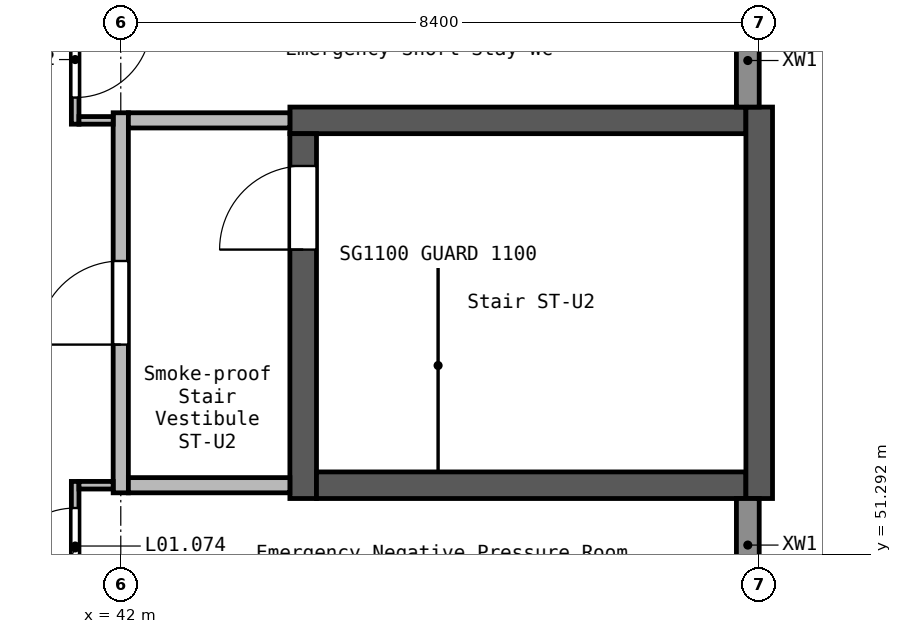
"""IFC4 building model, lengths in metres.
Left out: names, types, materials, properties, quantities, classifications, styles, units other than length and angle.
Written with IfcOpenShell. Run it as: python <this file> out.ifc"""

import sys

from ifc_helpers import new_model, si_unit, direction, frame, frame_2d, origin, place, context, subcontext, project, spatial, rectangle, extrude, element, fill, save


model = new_model("IFC4")
c1 = context("Model", 3, precision=1e-05, world=origin(), true_north=direction((0.0, 1.0)))
c2 = subcontext(c1, "Body", "Model", "MODEL_VIEW")
j1 = project(units=[si_unit("LENGTHUNIT", "METRE"), si_unit("PLANEANGLEUNIT", "RADIAN")], contexts=[c1])
p1 = place(None, origin())
s1 = spatial("IfcSite", under=j1, at=p1, CompositionType="ELEMENT")
p2 = place(p1, origin())
s2 = spatial("IfcBuilding", under=s1, at=p2, CompositionType="ELEMENT")
p3 = place(p2, frame((0.0, 0.0, 5.4)))
s3 = spatial("IfcBuildingStorey", under=s2, at=p3, CompositionType="ELEMENT", Elevation=5.4)
p4 = place(p3, frame((44.225, 57.0, 0.0), z_axis=(0.0, 0.0, 1.0), x_axis=(1.0, 0.0, 0.0)))
e1 = element("IfcWall", 1, at=p4, inside=s3, PredefinedType="SHEAR", context=c2, shape_type="SweptSolid", body=[
    extrude(rectangle(XDim=6.0, YDim=0.35, at=frame_2d((3.0, 0.0))), origin(), (0.0, 0.0, 1.0), 4.5),
])
p5 = place(p3, frame((44.4, 52.025, 0.0), z_axis=(0.0, 0.0, 1.0), x_axis=(0.0, 1.0, 0.0)))
e2 = element("IfcWall", 2, at=p5, inside=s3, PredefinedType="SHEAR", context=c2, shape_type="SweptSolid", body=[
    extrude(rectangle(XDim=4.8, YDim=0.35, at=frame_2d((2.4, 0.0))), origin(), (0.0, 0.0, 1.0), 4.5),
])
p6 = place(p5, frame((3.275, 0.0, 0.0)))
e3 = element("IfcOpeningElement", 3, at=p6, cuts=e2, PredefinedType="OPENING", context=c2, shape_type="SweptSolid", body=[
    extrude(rectangle(XDim=1.1, YDim=2.1, at=frame_2d((0.55, 1.05))), frame((0.0, 0.185, 0.0), z_axis=(0.0, -1.0, 0.0), x_axis=(1.0, 0.0, 0.0)), (0.0, 0.0, 1.0), 0.37),
])
p7 = place(p3, frame((44.575, 52.2, 0.0), z_axis=(0.0, 0.0, 1.0), x_axis=(1.0, 0.0, 0.0)))
e4 = element("IfcWall", 4, at=p7, inside=s3, PredefinedType="SHEAR", context=c2, shape_type="SweptSolid", body=[
    extrude(rectangle(XDim=5.65, YDim=0.35, at=frame_2d((2.825, 0.0))), origin(), (0.0, 0.0, 1.0), 4.5),
])
p8 = place(p3, frame((50.4, 52.025, 0.0), z_axis=(0.0, 0.0, 1.0), x_axis=(0.0, 1.0, 0.0)))
e5 = element("IfcWall", 5, at=p8, inside=s3, PredefinedType="SHEAR", context=c2, shape_type="SweptSolid", body=[
    extrude(rectangle(XDim=5.15, YDim=0.35, at=frame_2d((2.575, 0.0))), origin(), (0.0, 0.0, 1.0), 4.5),
])
for number, where, z_axis, x_axis in (
    (6, (50.25, 50.8, 0.0), (0.0, 0.0, 1.0), (0.0, 1.0, 0.0)),
    (7, (50.25, 57.175, 0.0), (0.0, 0.0, 1.0), (0.0, 1.0, 0.0)),
):
    element("IfcWall", number, at=place(p3, frame(where, z_axis=z_axis, x_axis=x_axis)), inside=s3, PredefinedType="STANDARD", context=c2, shape_type="SweptSolid", body=[
        extrude(rectangle(XDim=1.225, YDim=0.3, at=frame_2d((0.612, 0.0))), origin(), (0.0, 0.0, 1.0), 3.35),
    ])
p9 = place(p3, frame((42.0, 52.1, 0.0), z_axis=(0.0, 0.0, 1.0), x_axis=(0.0, 1.0, 0.0)))
e8 = element("IfcWall", 8, at=p9, inside=s3, PredefinedType="SOLIDWALL", context=c2, shape_type="SweptSolid", body=[
    extrude(rectangle(XDim=5.0, YDim=0.2, at=frame_2d((2.5, 0.0))), origin(), (0.0, 0.0, 1.0), 4.15),
])
p10 = place(p9, frame((1.95, 0.0, 0.0)))
e9 = element("IfcOpeningElement", 9, at=p10, cuts=e8, PredefinedType="OPENING", context=c2, shape_type="SweptSolid", body=[
    extrude(rectangle(XDim=1.1, YDim=2.1, at=frame_2d((0.55, 1.05))), frame((0.0, 0.11, 0.0), z_axis=(0.0, -1.0, 0.0), x_axis=(1.0, 0.0, 0.0)), (0.0, 0.0, 1.0), 0.22),
])
for number, where, z_axis, x_axis in (
    (10, (42.1, 52.2, 0.0), (0.0, 0.0, 1.0), (1.0, 0.0, 0.0)),
    (11, (42.1, 57.0, 0.0), (0.0, 0.0, 1.0), (1.0, 0.0, 0.0)),
):
    element("IfcWall", number, at=place(p3, frame(where, z_axis=z_axis, x_axis=x_axis)), inside=s3, PredefinedType="SOLIDWALL", context=c2, shape_type="SweptSolid", body=[
        extrude(rectangle(XDim=2.125, YDim=0.2, at=frame_2d((1.062, 0.0))), origin(), (0.0, 0.0, 1.0), 4.15),
    ])
p11 = place(p3, frame((41.4, 75.3, 0.0), z_axis=(0.0, 0.0, 1.0), x_axis=(0.0, -1.0, 0.0)))
e12 = element("IfcWall", 12, at=p11, inside=s3, PredefinedType="PARTITIONING", context=c2, shape_type="SweptSolid", body=[
    extrude(rectangle(XDim=18.35, YDim=0.1, at=frame_2d((9.175, 0.0))), origin(), (0.0, 0.0, 1.0), 4.15),
])
p12 = place(p11, frame((17.0, 0.0, 0.0)))
e13 = element("IfcOpeningElement", 13, at=p12, cuts=e12, PredefinedType="OPENING", context=c2, shape_type="SweptSolid", body=[
    extrude(rectangle(XDim=1.0, YDim=2.1, at=frame_2d((0.5, 1.05))), frame((0.0, 0.06, 0.0), z_axis=(0.0, -1.0, 0.0), x_axis=(1.0, 0.0, 0.0)), (0.0, 0.0, 1.0), 0.12),
])
p13 = place(p11, frame((13.05, 0.0, 0.0)))
e14 = element("IfcOpeningElement", 14, at=p13, cuts=e12, PredefinedType="OPENING", context=c2, shape_type="SweptSolid", body=[
    extrude(rectangle(XDim=0.9, YDim=2.1, at=frame_2d((0.45, 1.05))), frame((0.0, 0.06, 0.0), z_axis=(0.0, -1.0, 0.0), x_axis=(1.0, 0.0, 0.0)), (0.0, 0.0, 1.0), 0.12),
])
p14 = place(p11, frame((8.6, 0.0, 0.0)))
e15 = element("IfcOpeningElement", 15, at=p14, cuts=e12, PredefinedType="OPENING", context=c2, shape_type="SweptSolid", body=[
    extrude(rectangle(XDim=1.4, YDim=2.1, at=frame_2d((0.7, 1.05))), frame((0.0, 0.06, 0.0), z_axis=(0.0, -1.0, 0.0), x_axis=(1.0, 0.0, 0.0)), (0.0, 0.0, 1.0), 0.12),
])
p15 = place(p11, frame((5.0, 0.0, 0.0)))
e16 = element("IfcOpeningElement", 16, at=p15, cuts=e12, PredefinedType="OPENING", context=c2, shape_type="SweptSolid", body=[
    extrude(rectangle(XDim=1.4, YDim=2.1, at=frame_2d((0.7, 1.05))), frame((0.0, 0.06, 0.0), z_axis=(0.0, -1.0, 0.0), x_axis=(1.0, 0.0, 0.0)), (0.0, 0.0, 1.0), 0.12),
])
p16 = place(p11, frame((0.8, 0.0, 0.0)))
e17 = element("IfcOpeningElement", 17, at=p16, cuts=e12, PredefinedType="OPENING", context=c2, shape_type="SweptSolid", body=[
    extrude(rectangle(XDim=1.4, YDim=2.1, at=frame_2d((0.7, 1.05))), frame((0.0, 0.06, 0.0), z_axis=(0.0, -1.0, 0.0), x_axis=(1.0, 0.0, 0.0)), (0.0, 0.0, 1.0), 0.12),
])
p17 = place(p3, frame((41.4, 50.5, 0.0), z_axis=(0.0, 0.0, 1.0), x_axis=(0.0, 1.0, 0.0)))
e18 = element("IfcWall", 18, at=p17, inside=s3, PredefinedType="PARTITIONING", context=c2, shape_type="SweptSolid", body=[
    extrude(rectangle(XDim=1.75, YDim=0.1, at=frame_2d((0.875, 0.0))), origin(), (0.0, 0.0, 1.0), 4.15),
])
p18 = place(p17, frame((0.4, 0.0, 0.0)))
e19 = element("IfcOpeningElement", 19, at=p18, cuts=e18, PredefinedType="OPENING", context=c2, shape_type="SweptSolid", body=[
    extrude(rectangle(XDim=1.0, YDim=2.1, at=frame_2d((0.5, 1.05))), frame((0.0, 0.06, 0.0), z_axis=(0.0, -1.0, 0.0), x_axis=(1.0, 0.0, 0.0)), (0.0, 0.0, 1.0), 0.12),
])
for number, where, z_axis, x_axis in (
    (20, (41.45, 52.2, 0.0), (0.0, 0.0, 1.0), (1.0, 0.0, 0.0)),
    (21, (41.45, 57.0, 0.0), (0.0, 0.0, 1.0), (1.0, 0.0, 0.0)),
):
    element("IfcWall", number, at=place(p3, frame(where, z_axis=z_axis, x_axis=x_axis)), inside=s3, PredefinedType="PARTITIONING", context=c2, shape_type="SweptSolid", body=[
        extrude(rectangle(XDim=0.45, YDim=0.1, at=frame_2d((0.225, 0.0))), origin(), (0.0, 0.0, 1.0), 4.15),
    ])
p19 = place(p6, frame((1.1, 0.0, 0.0), z_axis=(0.0, 0.0, 1.0), x_axis=(-1.0, 0.0, 0.0)))
e22 = element("IfcDoor", 22, at=p19, inside=s3, OperationType="SINGLE_SWING_LEFT", PredefinedType="DOOR", context=c2, shape_type="SweptSolid", body=[
    extrude(rectangle(XDim=1.1, YDim=2.1, at=frame_2d((0.55, 1.05))), frame((0.0, 0.025, 0.0), z_axis=(0.0, -1.0, 0.0), x_axis=(1.0, 0.0, 0.0)), (0.0, 0.0, 1.0), 0.05),
])
fill(e3, e22)
p20 = place(p10, frame((1.1, 0.0, 0.0), z_axis=(0.0, 0.0, 1.0), x_axis=(-1.0, 0.0, 0.0)))
e23 = element("IfcDoor", 23, at=p20, inside=s3, OperationType="SINGLE_SWING_RIGHT", PredefinedType="DOOR", context=c2, shape_type="SweptSolid", body=[
    extrude(rectangle(XDim=1.1, YDim=2.1, at=frame_2d((0.55, 1.05))), frame((0.0, 0.025, 0.0), z_axis=(0.0, -1.0, 0.0), x_axis=(1.0, 0.0, 0.0)), (0.0, 0.0, 1.0), 0.05),
])
fill(e9, e23)
p21 = place(p18, frame((1.0, 0.0, 0.0), z_axis=(0.0, 0.0, 1.0), x_axis=(-1.0, 0.0, 0.0)))
e24 = element("IfcDoor", 24, at=p21, inside=s3, OperationType="SINGLE_SWING_LEFT", PredefinedType="DOOR", context=c2, shape_type="SweptSolid", body=[
    extrude(rectangle(XDim=1.0, YDim=2.1, at=frame_2d((0.5, 1.05))), frame((0.0, 0.025, 0.0), z_axis=(0.0, -1.0, 0.0), x_axis=(1.0, 0.0, 0.0)), (0.0, 0.0, 1.0), 0.05),
])
fill(e19, e24)
p22 = place(p12, origin())
e25 = element("IfcDoor", 25, at=p22, inside=s3, OperationType="SINGLE_SWING_RIGHT", PredefinedType="DOOR", context=c2, shape_type="SweptSolid", body=[
    extrude(rectangle(XDim=1.0, YDim=2.1, at=frame_2d((0.5, 1.05))), frame((0.0, 0.025, 0.0), z_axis=(0.0, -1.0, 0.0), x_axis=(1.0, 0.0, 0.0)), (0.0, 0.0, 1.0), 0.05),
])
fill(e13, e25)
save(model, sys.argv[1])
